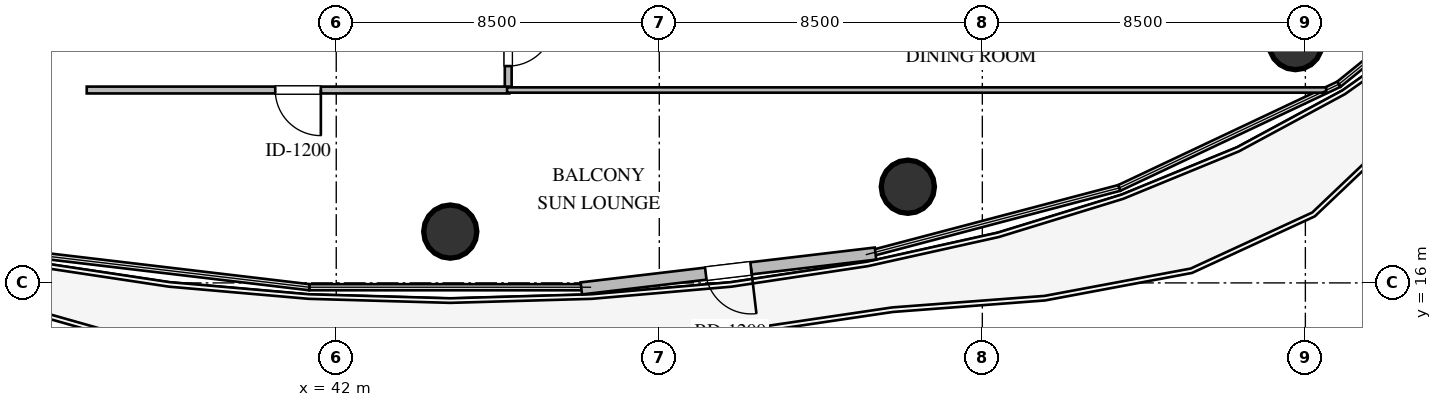
"""IFC4 building model, lengths in metres.
Left out: names, types, materials, properties, quantities, classifications, styles, units other than length and angle.
Written with IfcOpenShell. Run it as: python <this file> out.ifc"""

import sys

from ifc_helpers import new_model, si_unit, direction, frame, frame_2d, origin, origin_2d, place, context, subcontext, project, spatial, rectangle, circle, extrude, element, fill, save


model = new_model("IFC4")
c1 = context("Model", 3, precision=1e-05, world=origin(), true_north=direction((0.0, 1.0)))
c2 = subcontext(c1, "Body", "Model", "MODEL_VIEW")
j1 = project(units=[si_unit("LENGTHUNIT", "METRE"), si_unit("PLANEANGLEUNIT", "RADIAN")], contexts=[c1])
p1 = place(None, origin())
s1 = spatial("IfcSite", under=j1, at=p1, CompositionType="ELEMENT")
p2 = place(p1, origin())
s2 = spatial("IfcBuilding", under=s1, at=p2, CompositionType="ELEMENT")
p3 = place(p2, frame((0.0, 0.0, 81.6)))
s3 = spatial("IfcBuildingStorey", under=s2, at=p3, CompositionType="ELEMENT", Elevation=81.6)
for number, where, z_axis, x_axis in (
    (1, (45.0, 17.35, 0.0), (0.0, 0.0, 1.0), (1.0, 0.0, 0.0)),
    (2, (57.04, 18.53, 0.0), (0.0, 0.0, 1.0), (1.0, 0.0, 0.0)),
    (3, (67.24, 22.31, 0.0), (0.0, 0.0, 1.0), (1.0, 0.0, 0.0)),
):
    element("IfcColumn", number, at=place(p3, frame(where, z_axis=z_axis, x_axis=x_axis)), inside=s3, PredefinedType="COLUMN", context=c2, shape_type="SweptSolid", body=[
        extrude(circle(Radius=0.7, at=origin_2d()), origin(), (0.0, 0.0, 1.0), 3.6),
    ])
p4 = place(p3, frame((56.19, 16.772, 0.0), z_axis=(0.0, 0.0, 1.0), x_axis=(-0.993056646691, -0.117637138959, 0.0)))
e4 = element("IfcWall", 4, at=p4, inside=s3, PredefinedType="STANDARD", context=c2, shape_type="SweptSolid", body=[
    extrude(rectangle(XDim=7.795, YDim=0.32, at=frame_2d((3.897, 0.0))), origin(), (0.0, 0.0, 1.0), 3.36),
])
p5 = place(p4, frame((3.298, 0.0, 0.0)))
e5 = element("IfcOpeningElement", 5, at=p5, cuts=e4, PredefinedType="OPENING", context=c2, shape_type="SweptSolid", body=[
    extrude(rectangle(XDim=1.2, YDim=2.15, at=frame_2d((0.6, 1.075))), frame((0.0, 0.17, 0.0), z_axis=(0.0, -1.0, 0.0), x_axis=(1.0, 0.0, 0.0)), (0.0, 0.0, 1.0), 0.34),
])
p6 = place(p3, frame((46.525, 23.565, 0.0), z_axis=(0.0, 0.0, 1.0), x_axis=(0.0, -1.0, 0.0)))
e6 = element("IfcWall", 6, at=p6, inside=s3, PredefinedType="PARTITIONING", context=c2, shape_type="SweptSolid", body=[
    extrude(rectangle(XDim=2.52, YDim=0.18, at=frame_2d((1.26, 0.0))), origin(), (0.0, 0.0, 1.0), 3.36),
])
p7 = place(p6, frame((0.66, 0.0, 0.0)))
e7 = element("IfcOpeningElement", 7, at=p7, cuts=e6, PredefinedType="OPENING", context=c2, shape_type="SweptSolid", body=[
    extrude(rectangle(XDim=1.2, YDim=2.15, at=frame_2d((0.6, 1.075))), frame((0.0, 0.1, 0.0), z_axis=(0.0, -1.0, 0.0), x_axis=(1.0, 0.0, 0.0)), (0.0, 0.0, 1.0), 0.2),
])
p8 = place(p3, frame((46.555, 21.075, 0.0), z_axis=(0.0, 0.0, 1.0), x_axis=(-1.0, 0.0, 0.0)))
e8 = element("IfcWall", 8, at=p8, inside=s3, PredefinedType="PARTITIONING", context=c2, shape_type="SweptSolid", body=[
    extrude(rectangle(XDim=11.12, YDim=0.18, at=frame_2d((5.56, 0.0))), origin(), (0.0, 0.0, 1.0), 2.996),
])
p9 = place(p8, frame((4.96, 0.0, 0.0)))
e9 = element("IfcOpeningElement", 9, at=p9, cuts=e8, PredefinedType="OPENING", context=c2, shape_type="SweptSolid", body=[
    extrude(rectangle(XDim=1.2, YDim=2.15, at=frame_2d((0.6, 1.075))), frame((0.0, 0.1, 0.0), z_axis=(0.0, -1.0, 0.0), x_axis=(1.0, 0.0, 0.0)), (0.0, 0.0, 1.0), 0.2),
])
p10 = place(p3, frame((68.049, 21.075, 0.0), z_axis=(0.0, 0.0, 1.0), x_axis=(-1.0, 0.0, 0.0)))
e10 = element("IfcWall", 10, at=p10, inside=s3, PredefinedType="PARTITIONING", context=c2, shape_type="SweptSolid", body=[
    extrude(rectangle(XDim=21.554, YDim=0.14, at=frame_2d((10.777, 0.0))), origin(), (0.0, 0.0, 1.0), 2.996),
])
p11 = place(p5, origin())
e11 = element("IfcDoor", 11, at=p11, inside=s3, OperationType="SINGLE_SWING_LEFT", PredefinedType="DOOR", context=c2, shape_type="SweptSolid", body=[
    extrude(rectangle(XDim=1.2, YDim=2.15, at=frame_2d((0.6, 1.075))), frame((0.0, 0.025, 0.0), z_axis=(0.0, -1.0, 0.0), x_axis=(1.0, 0.0, 0.0)), (0.0, 0.0, 1.0), 0.05),
])
fill(e5, e11)
p12 = place(p7, origin())
e12 = element("IfcDoor", 12, at=p12, inside=s3, OperationType="SINGLE_SWING_LEFT", PredefinedType="DOOR", context=c2, shape_type="SweptSolid", body=[
    extrude(rectangle(XDim=1.2, YDim=2.15, at=frame_2d((0.6, 1.075))), frame((0.0, 0.025, 0.0), z_axis=(0.0, -1.0, 0.0), x_axis=(1.0, 0.0, 0.0)), (0.0, 0.0, 1.0), 0.05),
])
fill(e7, e12)
p13 = place(p9, origin())
e13 = element("IfcDoor", 13, at=p13, inside=s3, OperationType="SINGLE_SWING_LEFT", PredefinedType="DOOR", context=c2, shape_type="SweptSolid", body=[
    extrude(rectangle(XDim=1.2, YDim=2.15, at=frame_2d((0.6, 1.075))), frame((0.0, 0.025, 0.0), z_axis=(0.0, -1.0, 0.0), x_axis=(1.0, 0.0, 0.0)), (0.0, 0.0, 1.0), 0.05),
])
fill(e9, e13)
save(model, sys.argv[1])
